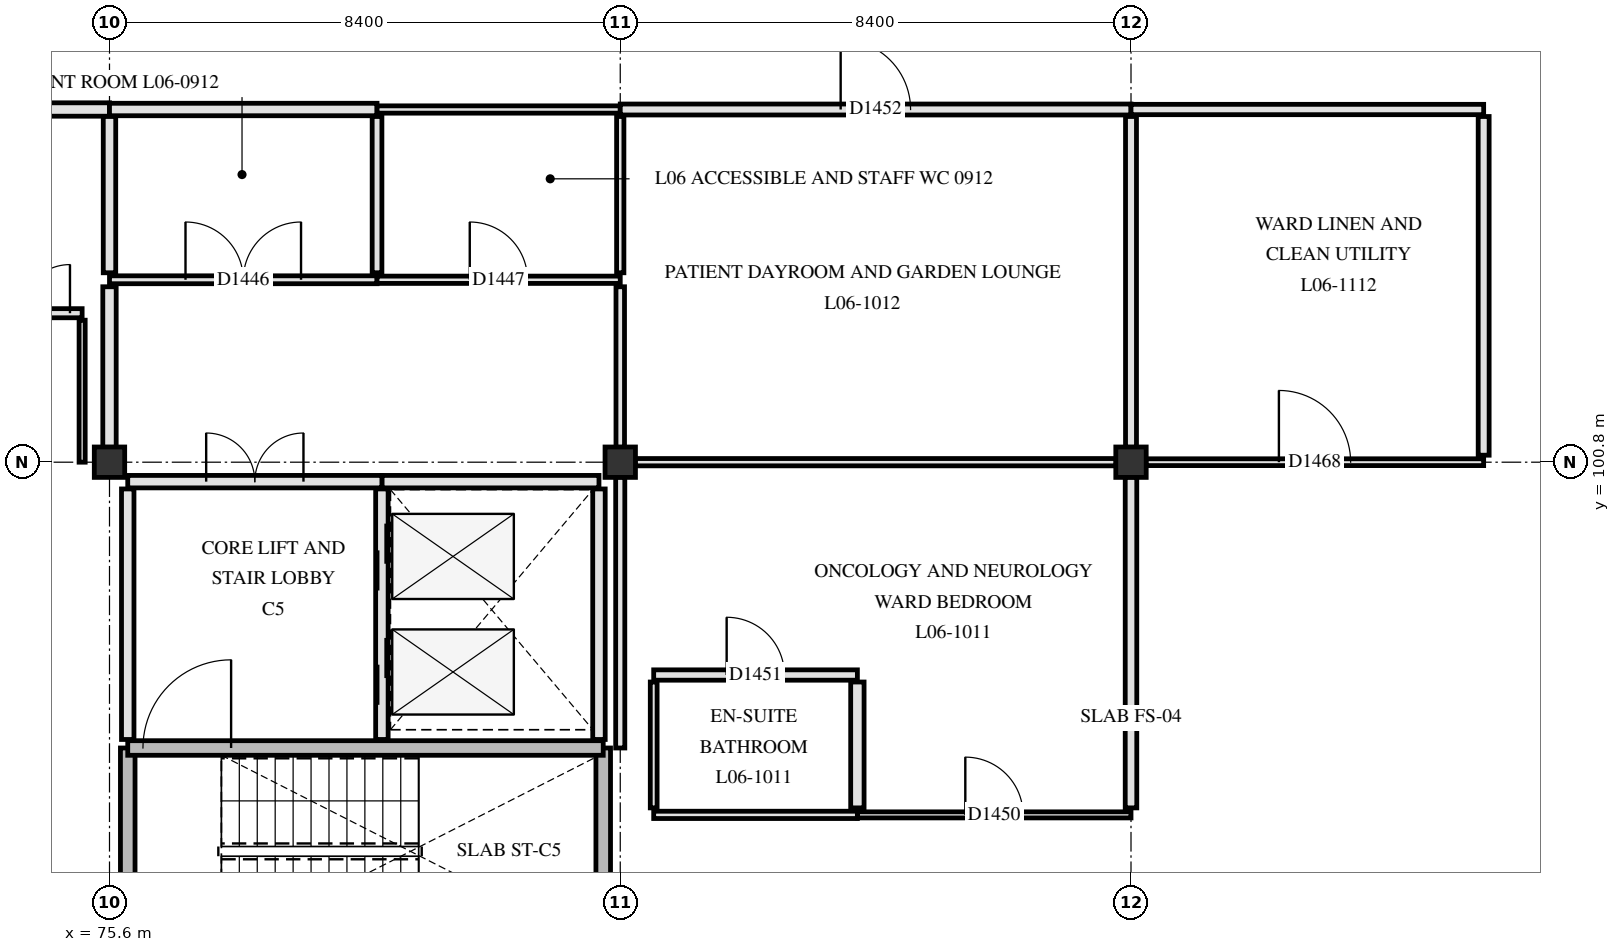
"""IFC4 building model, lengths in metres.
Left out: names, types, materials, properties, quantities, classifications, styles, units other than length and angle.
Written with IfcOpenShell. Run it as: python <this file> out.ifc"""

import sys

from ifc_helpers import new_model, si_unit, direction, frame, frame_2d, origin, origin_2d, place, context, subcontext, project, spatial, rectangle, extrude, element, fill, save


model = new_model("IFC4")
c1 = context("Model", 3, precision=1e-05, world=origin(), true_north=direction((0.0, 1.0)))
c2 = subcontext(c1, "Body", "Model", "MODEL_VIEW")
j1 = project(units=[si_unit("LENGTHUNIT", "METRE"), si_unit("PLANEANGLEUNIT", "RADIAN")], contexts=[c1])
p1 = place(None, origin())
s1 = spatial("IfcSite", under=j1, at=p1, CompositionType="ELEMENT")
p2 = place(p1, origin())
s2 = spatial("IfcBuilding", under=s1, at=p2, CompositionType="ELEMENT")
p3 = place(p2, frame((0.0, 0.0, 26.4)))
s3 = spatial("IfcBuildingStorey", under=s2, at=p3, CompositionType="ELEMENT", Elevation=26.4)
for number, where, z_axis, x_axis in (
    (1, (75.6, 100.8, 0.0), (0.0, 0.0, 1.0), (1.0, 0.0, 0.0)),
    (2, (84.0, 100.8, 0.0), (0.0, 0.0, 1.0), (1.0, 0.0, 0.0)),
    (3, (92.4, 100.8, 0.0), (0.0, 0.0, 1.0), (1.0, 0.0, 0.0)),
):
    element("IfcColumn", number, at=place(p3, frame(where, z_axis=z_axis, x_axis=x_axis)), inside=s3, PredefinedType="COLUMN", context=c2, shape_type="SweptSolid", body=[
        extrude(rectangle(XDim=0.5, YDim=0.5, at=origin_2d()), origin(), (0.0, 0.0, 1.0), 3.9),
    ])
for number, where, z_axis, x_axis in (
    (4, (75.9, 92.78, 0.0), (0.0, 0.0, 1.0), (0.0, 1.0, 0.0)),
    (5, (83.72, 92.78, 0.0), (0.0, 0.0, 1.0), (0.0, 1.0, 0.0)),
):
    element("IfcWall", number, at=place(p3, frame(where, z_axis=z_axis, x_axis=x_axis)), inside=s3, PredefinedType="SHEAR", context=c2, shape_type="SweptSolid", body=[
        extrude(rectangle(XDim=3.32, YDim=0.24, at=frame_2d((1.66, 0.0))), origin(), (0.0, 0.0, 1.0), 3.62),
    ])
p4 = place(p3, frame((75.9, 96.1, 0.0), z_axis=(0.0, 0.0, 1.0), x_axis=(1.0, 0.0, 0.0)))
e6 = element("IfcWall", 6, at=p4, inside=s3, PredefinedType="SHEAR", context=c2, shape_type="SweptSolid", body=[
    extrude(rectangle(XDim=7.82, YDim=0.24, at=frame_2d((3.91, 0.0))), origin(), (0.0, 0.0, 1.0), 3.62),
])
p5 = place(p4, frame((0.25, 0.0, 0.0)))
e7 = element("IfcOpeningElement", 7, at=p5, cuts=e6, PredefinedType="OPENING", context=c2, shape_type="SweptSolid", body=[
    extrude(rectangle(XDim=1.45, YDim=2.2, at=frame_2d((0.725, 1.1))), frame((0.0, 0.13, 0.0), z_axis=(0.0, -1.0, 0.0), x_axis=(1.0, 0.0, 0.0)), (0.0, 0.0, 1.0), 0.26),
])
p6 = place(p3, frame((80.08, 96.24, 0.0), z_axis=(0.0, 0.0, 1.0), x_axis=(0.0, 1.0, 0.0)))
e8 = element("IfcWall", 8, at=p6, inside=s3, PredefinedType="PARTITIONING", context=c2, shape_type="SweptSolid", body=[
    extrude(rectangle(XDim=4.12, YDim=0.205, at=frame_2d((2.06, 0.0))), origin(), (0.0, 0.0, 1.0), 3.61),
])
p7 = place(p6, frame((0.57, 0.0, 0.0)))
e9 = element("IfcOpeningElement", 9, at=p7, cuts=e8, PredefinedType="OPENING", context=c2, shape_type="SweptSolid", body=[
    extrude(rectangle(XDim=1.1, YDim=2.15, at=frame_2d((0.55, 1.075))), frame((0.0, 0.113, 0.0), z_axis=(0.0, -1.0, 0.0), x_axis=(1.0, 0.0, 0.0)), (0.0, 0.0, 1.0), 0.225),
])
p8 = place(p6, frame((2.45, 0.0, 0.0)))
e10 = element("IfcOpeningElement", 10, at=p8, cuts=e8, PredefinedType="OPENING", context=c2, shape_type="SweptSolid", body=[
    extrude(rectangle(XDim=1.1, YDim=2.15, at=frame_2d((0.55, 1.075))), frame((0.0, 0.113, 0.0), z_axis=(0.0, -1.0, 0.0), x_axis=(1.0, 0.0, 0.0)), (0.0, 0.0, 1.0), 0.225),
])
p9 = place(p3, frame((83.65, 96.24, 0.0), z_axis=(0.0, 0.0, 1.0), x_axis=(0.0, 1.0, 0.0)))
e11 = element("IfcWall", 11, at=p9, inside=s3, PredefinedType="PARTITIONING", context=c2, shape_type="SweptSolid", body=[
    extrude(rectangle(XDim=4.12, YDim=0.205, at=frame_2d((2.06, 0.0))), origin(), (0.0, 0.0, 1.0), 3.61),
])
p10 = place(p3, frame((80.08, 100.48, 0.0), z_axis=(0.0, 0.0, 1.0), x_axis=(1.0, 0.0, 0.0)))
e12 = element("IfcWall", 12, at=p10, inside=s3, PredefinedType="PARTITIONING", context=c2, shape_type="SweptSolid", body=[
    extrude(rectangle(XDim=3.57, YDim=0.205, at=frame_2d((1.785, 0.0))), origin(), (0.0, 0.0, 1.0), 3.61),
])
p11 = place(p3, frame((75.9, 96.24, 0.0), z_axis=(0.0, 0.0, 1.0), x_axis=(0.0, 1.0, 0.0)))
e13 = element("IfcWall", 13, at=p11, inside=s3, PredefinedType="PARTITIONING", context=c2, shape_type="SweptSolid", body=[
    extrude(rectangle(XDim=4.12, YDim=0.205, at=frame_2d((2.06, 0.0))), origin(), (0.0, 0.0, 1.0), 3.61),
])
p12 = place(p3, frame((75.9, 100.48, 0.0), z_axis=(0.0, 0.0, 1.0), x_axis=(1.0, 0.0, 0.0)))
e14 = element("IfcWall", 14, at=p12, inside=s3, PredefinedType="PARTITIONING", context=c2, shape_type="SweptSolid", body=[
    extrude(rectangle(XDim=4.18, YDim=0.205, at=frame_2d((2.09, 0.0))), origin(), (0.0, 0.0, 1.0), 3.61),
])
p13 = place(p12, frame((1.29, 0.0, 0.0)))
e15 = element("IfcOpeningElement", 15, at=p13, cuts=e14, PredefinedType="OPENING", context=c2, shape_type="SweptSolid", body=[
    extrude(rectangle(XDim=1.6, YDim=2.25, at=frame_2d((0.8, 1.125))), frame((0.0, 0.113, 0.0), z_axis=(0.0, -1.0, 0.0), x_axis=(1.0, 0.0, 0.0)), (0.0, 0.0, 1.0), 0.225),
])
p14 = place(p3, frame((84.55, 95.0, 0.0), z_axis=(0.0, 0.0, 1.0), x_axis=(1.0, 0.0, 0.0)))
e16 = element("IfcWall", 16, at=p14, inside=s3, PredefinedType="PARTITIONING", context=c2, shape_type="SweptSolid", body=[
    extrude(rectangle(XDim=3.35, YDim=0.12, at=frame_2d((1.675, 0.0))), origin(), (0.0, 0.0, 1.0), 3.61),
])
p15 = place(p3, frame((87.9, 95.0, 0.0), z_axis=(0.0, 0.0, 1.0), x_axis=(1.0, 0.0, 0.0)))
e17 = element("IfcWall", 17, at=p15, inside=s3, PredefinedType="PARTITIONING", context=c2, shape_type="SweptSolid", body=[
    extrude(rectangle(XDim=4.5, YDim=0.1, at=frame_2d((2.25, 0.0))), origin(), (0.0, 0.0, 1.0), 3.21),
])
p16 = place(p15, frame((1.775, 0.0, 0.0)))
e18 = element("IfcOpeningElement", 18, at=p16, cuts=e17, PredefinedType="OPENING", context=c2, shape_type="SweptSolid", body=[
    extrude(rectangle(XDim=0.95, YDim=2.1, at=frame_2d((0.475, 1.05))), frame((0.0, 0.06, 0.0), z_axis=(0.0, -1.0, 0.0), x_axis=(1.0, 0.0, 0.0)), (0.0, 0.0, 1.0), 0.12),
])
p17 = place(p3, frame((84.55, 97.3, 0.0), z_axis=(0.0, 0.0, 1.0), x_axis=(1.0, 0.0, 0.0)))
e19 = element("IfcWall", 19, at=p17, inside=s3, PredefinedType="PARTITIONING", context=c2, shape_type="SweptSolid", body=[
    extrude(rectangle(XDim=3.35, YDim=0.17, at=frame_2d((1.675, 0.0))), origin(), (0.0, 0.0, 1.0), 3.61),
])
p18 = place(p17, frame((1.2, 0.0, 0.0)))
e20 = element("IfcOpeningElement", 20, at=p18, cuts=e19, PredefinedType="OPENING", context=c2, shape_type="SweptSolid", body=[
    extrude(rectangle(XDim=0.95, YDim=2.1, at=frame_2d((0.475, 1.05))), frame((0.0, 0.095, 0.0), z_axis=(0.0, -1.0, 0.0), x_axis=(1.0, 0.0, 0.0)), (0.0, 0.0, 1.0), 0.19),
])
p19 = place(p3, frame((84.245, 100.8, 0.0), z_axis=(0.0, 0.0, 1.0), x_axis=(1.0, 0.0, 0.0)))
e21 = element("IfcWall", 21, at=p19, inside=s3, PredefinedType="PARTITIONING", context=c2, shape_type="SweptSolid", body=[
    extrude(rectangle(XDim=7.91, YDim=0.12, at=frame_2d((3.955, 0.0))), origin(), (0.0, 0.0, 1.0), 3.21),
])
p20 = place(p3, frame((92.645, 100.8, 0.0), z_axis=(0.0, 0.0, 1.0), x_axis=(1.0, 0.0, 0.0)))
e22 = element("IfcWall", 22, at=p20, inside=s3, PredefinedType="PARTITIONING", context=c2, shape_type="SweptSolid", body=[
    extrude(rectangle(XDim=5.555, YDim=0.112, at=frame_2d((2.777, 0.0))), origin(), (0.0, 0.0, 1.0), 3.21),
])
p21 = place(p20, frame((2.188, 0.0, 0.0)))
e23 = element("IfcOpeningElement", 23, at=p21, cuts=e22, PredefinedType="OPENING", context=c2, shape_type="SweptSolid", body=[
    extrude(rectangle(XDim=1.18, YDim=2.18, at=frame_2d((0.59, 1.09))), frame((0.0, 0.066, 0.0), z_axis=(0.0, -1.0, 0.0), x_axis=(1.0, 0.0, 0.0)), (0.0, 0.0, 1.0), 0.132),
])
p22 = place(p3, frame((73.15, 103.25, 0.0), z_axis=(0.0, 0.0, 1.0), x_axis=(1.0, 0.0, 0.0)))
e24 = element("IfcWall", 24, at=p22, inside=s3, PredefinedType="PARTITIONING", context=c2, shape_type="SweptSolid", body=[
    extrude(rectangle(XDim=2.0, YDim=0.15, at=frame_2d((1.0, 0.0))), origin(), (0.0, 0.0, 1.0), 3.61),
])
p23 = place(p22, frame((0.2, 0.0, 0.0)))
e25 = element("IfcOpeningElement", 25, at=p23, cuts=e24, PredefinedType="OPENING", context=c2, shape_type="SweptSolid", body=[
    extrude(rectangle(XDim=1.6, YDim=2.25, at=frame_2d((0.8, 1.125))), frame((0.0, 0.085, 0.0), z_axis=(0.0, -1.0, 0.0), x_axis=(1.0, 0.0, 0.0)), (0.0, 0.0, 1.0), 0.17),
])
p24 = place(p3, frame((75.6, 103.8, 0.0), z_axis=(0.0, 0.0, 1.0), x_axis=(1.0, 0.0, 0.0)))
e26 = element("IfcWall", 26, at=p24, inside=s3, PredefinedType="PARTITIONING", context=c2, shape_type="SweptSolid", body=[
    extrude(rectangle(XDim=4.4, YDim=0.13, at=frame_2d((2.2, 0.0))), origin(), (0.0, 0.0, 1.0), 3.21),
])
p25 = place(p24, frame((1.25, 0.0, 0.0)))
e27 = element("IfcOpeningElement", 27, at=p25, cuts=e26, PredefinedType="OPENING", context=c2, shape_type="SweptSolid", body=[
    extrude(rectangle(XDim=1.9, YDim=2.3, at=frame_2d((0.95, 1.15))), frame((0.0, 0.075, 0.0), z_axis=(0.0, -1.0, 0.0), x_axis=(1.0, 0.0, 0.0)), (0.0, 0.0, 1.0), 0.15),
])
p26 = place(p3, frame((80.0, 103.8, 0.0), z_axis=(0.0, 0.0, 1.0), x_axis=(1.0, 0.0, 0.0)))
e28 = element("IfcWall", 28, at=p26, inside=s3, PredefinedType="PARTITIONING", context=c2, shape_type="SweptSolid", body=[
    extrude(rectangle(XDim=4.0, YDim=0.12, at=frame_2d((2.0, 0.0))), origin(), (0.0, 0.0, 1.0), 3.21),
])
p27 = place(p26, frame((1.525, 0.0, 0.0)))
e29 = element("IfcOpeningElement", 29, at=p27, cuts=e28, PredefinedType="OPENING", context=c2, shape_type="SweptSolid", body=[
    extrude(rectangle(XDim=0.95, YDim=2.1, at=frame_2d((0.475, 1.05))), frame((0.0, 0.07, 0.0), z_axis=(0.0, -1.0, 0.0), x_axis=(1.0, 0.0, 0.0)), (0.0, 0.0, 1.0), 0.14),
])
p28 = place(p3, frame((69.8, 106.6, 0.0), z_axis=(0.0, 0.0, 1.0), x_axis=(1.0, 0.0, 0.0)))
e30 = element("IfcWall", 30, at=p28, inside=s3, PredefinedType="PARTITIONING", context=c2, shape_type="SweptSolid", body=[
    extrude(rectangle(XDim=5.8, YDim=0.22, at=frame_2d((2.9, 0.0))), origin(), (0.0, 0.0, 1.0), 3.21),
])
p29 = place(p3, frame((75.6, 106.6, 0.0), z_axis=(0.0, 0.0, 1.0), x_axis=(1.0, 0.0, 0.0)))
e31 = element("IfcWall", 31, at=p29, inside=s3, PredefinedType="PARTITIONING", context=c2, shape_type="SweptSolid", body=[
    extrude(rectangle(XDim=4.4, YDim=0.205, at=frame_2d((2.2, 0.0))), origin(), (0.0, 0.0, 1.0), 3.21),
])
p30 = place(p3, frame((80.0, 106.6, 0.0), z_axis=(0.0, 0.0, 1.0), x_axis=(1.0, 0.0, 0.0)))
e32 = element("IfcWall", 32, at=p30, inside=s3, PredefinedType="PARTITIONING", context=c2, shape_type="SweptSolid", body=[
    extrude(rectangle(XDim=4.0, YDim=0.12, at=frame_2d((2.0, 0.0))), origin(), (0.0, 0.0, 1.0), 3.21),
])
p31 = place(p3, frame((84.0, 106.6, 0.0), z_axis=(0.0, 0.0, 1.0), x_axis=(1.0, 0.0, 0.0)))
e33 = element("IfcWall", 33, at=p31, inside=s3, PredefinedType="PARTITIONING", context=c2, shape_type="SweptSolid", body=[
    extrude(rectangle(XDim=8.4, YDim=0.18, at=frame_2d((4.2, 0.0))), origin(), (0.0, 0.0, 1.0), 3.21),
])
p32 = place(p31, frame((3.625, 0.0, 0.0)))
e34 = element("IfcOpeningElement", 34, at=p32, cuts=e33, PredefinedType="OPENING", context=c2, shape_type="SweptSolid", body=[
    extrude(rectangle(XDim=1.15, YDim=2.15, at=frame_2d((0.575, 1.075))), frame((0.0, 0.1, 0.0), z_axis=(0.0, -1.0, 0.0), x_axis=(1.0, 0.0, 0.0)), (0.0, 0.0, 1.0), 0.2),
])
p33 = place(p3, frame((92.4, 106.6, 0.0), z_axis=(0.0, 0.0, 1.0), x_axis=(1.0, 0.0, 0.0)))
e35 = element("IfcWall", 35, at=p33, inside=s3, PredefinedType="PARTITIONING", context=c2, shape_type="SweptSolid", body=[
    extrude(rectangle(XDim=5.8, YDim=0.17, at=frame_2d((2.9, 0.0))), origin(), (0.0, 0.0, 1.0), 3.21),
])
p34 = place(p3, frame((75.15, 100.8, 0.0), z_axis=(0.0, 0.0, 1.0), x_axis=(0.0, 1.0, 0.0)))
e36 = element("IfcWall", 36, at=p34, inside=s3, PredefinedType="PARTITIONING", context=c2, shape_type="SweptSolid", body=[
    extrude(rectangle(XDim=2.335, YDim=0.1, at=frame_2d((1.167, 0.0))), origin(), (0.0, 0.0, 1.0), 3.21),
])
p35 = place(p3, frame((75.6, 101.045, 0.0), z_axis=(0.0, 0.0, 1.0), x_axis=(0.0, 1.0, 0.0)))
e37 = element("IfcWall", 37, at=p35, inside=s3, PredefinedType="PARTITIONING", context=c2, shape_type="SweptSolid", body=[
    extrude(rectangle(XDim=2.64, YDim=0.22, at=frame_2d((1.32, 0.0))), origin(), (0.0, 0.0, 1.0), 3.21),
])
p36 = place(p3, frame((75.6, 103.915, 0.0), z_axis=(0.0, 0.0, 1.0), x_axis=(0.0, 1.0, 0.0)))
e38 = element("IfcWall", 38, at=p36, inside=s3, PredefinedType="PARTITIONING", context=c2, shape_type="SweptSolid", body=[
    extrude(rectangle(XDim=2.57, YDim=0.205, at=frame_2d((1.285, 0.0))), origin(), (0.0, 0.0, 1.0), 3.21),
])
p37 = place(p3, frame((80.0, 103.915, 0.0), z_axis=(0.0, 0.0, 1.0), x_axis=(0.0, 1.0, 0.0)))
e39 = element("IfcWall", 39, at=p37, inside=s3, PredefinedType="PARTITIONING", context=c2, shape_type="SweptSolid", body=[
    extrude(rectangle(XDim=2.57, YDim=0.16, at=frame_2d((1.285, 0.0))), origin(), (0.0, 0.0, 1.0), 3.34),
])
p38 = place(p3, frame((84.0, 96.1, 0.0), z_axis=(0.0, 0.0, 1.0), x_axis=(0.0, 1.0, 0.0)))
e40 = element("IfcWall", 40, at=p38, inside=s3, PredefinedType="PARTITIONING", context=c2, shape_type="SweptSolid", body=[
    extrude(rectangle(XDim=4.455, YDim=0.15, at=frame_2d((2.228, 0.0))), origin(), (0.0, 0.0, 1.0), 3.21),
])
p39 = place(p3, frame((84.0, 101.045, 0.0), z_axis=(0.0, 0.0, 1.0), x_axis=(0.0, 1.0, 0.0)))
e41 = element("IfcWall", 41, at=p39, inside=s3, PredefinedType="PARTITIONING", context=c2, shape_type="SweptSolid", body=[
    extrude(rectangle(XDim=2.64, YDim=0.14, at=frame_2d((1.32, 0.0))), origin(), (0.0, 0.0, 1.0), 3.21),
])
p40 = place(p3, frame((84.0, 103.915, 0.0), z_axis=(0.0, 0.0, 1.0), x_axis=(0.0, 1.0, 0.0)))
e42 = element("IfcWall", 42, at=p40, inside=s3, PredefinedType="PARTITIONING", context=c2, shape_type="SweptSolid", body=[
    extrude(rectangle(XDim=2.57, YDim=0.12, at=frame_2d((1.285, 0.0))), origin(), (0.0, 0.0, 1.0), 3.21),
])
p41 = place(p3, frame((84.55, 95.115, 0.0), z_axis=(0.0, 0.0, 1.0), x_axis=(0.0, 1.0, 0.0)))
e43 = element("IfcWall", 43, at=p41, inside=s3, PredefinedType="PARTITIONING", context=c2, shape_type="SweptSolid", body=[
    extrude(rectangle(XDim=2.07, YDim=0.112, at=frame_2d((1.035, 0.0))), origin(), (0.0, 0.0, 1.0), 3.34),
])
p42 = place(p3, frame((87.9, 95.115, 0.0), z_axis=(0.0, 0.0, 1.0), x_axis=(0.0, 1.0, 0.0)))
e44 = element("IfcWall", 44, at=p42, inside=s3, PredefinedType="PARTITIONING", context=c2, shape_type="SweptSolid", body=[
    extrude(rectangle(XDim=2.07, YDim=0.22, at=frame_2d((1.035, 0.0))), origin(), (0.0, 0.0, 1.0), 3.34),
])
p43 = place(p3, frame((92.4, 95.115, 0.0), z_axis=(0.0, 0.0, 1.0), x_axis=(0.0, 1.0, 0.0)))
e45 = element("IfcWall", 45, at=p43, inside=s3, PredefinedType="PARTITIONING", context=c2, shape_type="SweptSolid", body=[
    extrude(rectangle(XDim=5.44, YDim=0.19, at=frame_2d((2.72, 0.0))), origin(), (0.0, 0.0, 1.0), 3.21),
])
p44 = place(p3, frame((92.4, 101.045, 0.0), z_axis=(0.0, 0.0, 1.0), x_axis=(0.0, 1.0, 0.0)))
e46 = element("IfcWall", 46, at=p44, inside=s3, PredefinedType="PARTITIONING", context=c2, shape_type="SweptSolid", body=[
    extrude(rectangle(XDim=5.44, YDim=0.18, at=frame_2d((2.72, 0.0))), origin(), (0.0, 0.0, 1.0), 3.21),
])
p45 = place(p3, frame((98.2, 100.915, 0.0), z_axis=(0.0, 0.0, 1.0), x_axis=(0.0, 1.0, 0.0)))
e47 = element("IfcWall", 47, at=p45, inside=s3, PredefinedType="PARTITIONING", context=c2, shape_type="SweptSolid", body=[
    extrude(rectangle(XDim=5.57, YDim=0.18, at=frame_2d((2.785, 0.0))), origin(), (0.0, 0.0, 1.0), 3.34),
])
p46 = place(p5, origin())
e48 = element("IfcDoor", 48, at=p46, inside=s3, OperationType="SINGLE_SWING_RIGHT", PredefinedType="DOOR", context=c2, shape_type="SweptSolid", body=[
    extrude(rectangle(XDim=1.45, YDim=2.2, at=frame_2d((0.725, 1.1))), frame((0.0, 0.025, 0.0), z_axis=(0.0, -1.0, 0.0), x_axis=(1.0, 0.0, 0.0)), (0.0, 0.0, 1.0), 0.05),
])
fill(e7, e48)
p47 = place(p7, origin())
e49 = element("IfcDoor", 49, at=p47, inside=s3, OperationType="SLIDING_TO_LEFT", PredefinedType="DOOR", context=c2, shape_type="SweptSolid", body=[
    extrude(rectangle(XDim=1.1, YDim=2.15, at=frame_2d((0.55, 1.075))), frame((0.0, 0.025, 0.0), z_axis=(0.0, -1.0, 0.0), x_axis=(1.0, 0.0, 0.0)), (0.0, 0.0, 1.0), 0.05),
])
fill(e9, e49)
p48 = place(p8, origin())
e50 = element("IfcDoor", 50, at=p48, inside=s3, OperationType="SLIDING_TO_LEFT", PredefinedType="DOOR", context=c2, shape_type="SweptSolid", body=[
    extrude(rectangle(XDim=1.1, YDim=2.15, at=frame_2d((0.55, 1.075))), frame((0.0, 0.025, 0.0), z_axis=(0.0, -1.0, 0.0), x_axis=(1.0, 0.0, 0.0)), (0.0, 0.0, 1.0), 0.05),
])
fill(e10, e50)
p49 = place(p13, origin())
e51 = element("IfcDoor", 51, at=p49, inside=s3, OperationType="DOUBLE_SWING_LEFT", PredefinedType="DOOR", context=c2, shape_type="SweptSolid", body=[
    extrude(rectangle(XDim=1.6, YDim=2.25, at=frame_2d((0.8, 1.125))), frame((0.0, 0.025, 0.0), z_axis=(0.0, -1.0, 0.0), x_axis=(1.0, 0.0, 0.0)), (0.0, 0.0, 1.0), 0.05),
])
fill(e15, e51)
p50 = place(p23, origin())
e52 = element("IfcDoor", 52, at=p50, inside=s3, OperationType="DOUBLE_SWING_LEFT", PredefinedType="DOOR", context=c2, shape_type="SweptSolid", body=[
    extrude(rectangle(XDim=1.6, YDim=2.25, at=frame_2d((0.8, 1.125))), frame((0.0, 0.025, 0.0), z_axis=(0.0, -1.0, 0.0), x_axis=(1.0, 0.0, 0.0)), (0.0, 0.0, 1.0), 0.05),
])
fill(e25, e52)
p51 = place(p25, origin())
e53 = element("IfcDoor", 53, at=p51, inside=s3, OperationType="DOUBLE_SWING_LEFT", PredefinedType="DOOR", context=c2, shape_type="SweptSolid", body=[
    extrude(rectangle(XDim=1.9, YDim=2.3, at=frame_2d((0.95, 1.15))), frame((0.0, 0.025, 0.0), z_axis=(0.0, -1.0, 0.0), x_axis=(1.0, 0.0, 0.0)), (0.0, 0.0, 1.0), 0.05),
])
fill(e27, e53)
p52 = place(p27, origin())
e54 = element("IfcDoor", 54, at=p52, inside=s3, OperationType="SINGLE_SWING_LEFT", PredefinedType="DOOR", context=c2, shape_type="SweptSolid", body=[
    extrude(rectangle(XDim=0.95, YDim=2.1, at=frame_2d((0.475, 1.05))), frame((0.0, 0.025, 0.0), z_axis=(0.0, -1.0, 0.0), x_axis=(1.0, 0.0, 0.0)), (0.0, 0.0, 1.0), 0.05),
])
fill(e29, e54)
p53 = place(p16, origin())
e55 = element("IfcDoor", 55, at=p53, inside=s3, OperationType="SINGLE_SWING_LEFT", PredefinedType="DOOR", context=c2, shape_type="SweptSolid", body=[
    extrude(rectangle(XDim=0.95, YDim=2.1, at=frame_2d((0.475, 1.05))), frame((0.0, 0.025, 0.0), z_axis=(0.0, -1.0, 0.0), x_axis=(1.0, 0.0, 0.0)), (0.0, 0.0, 1.0), 0.05),
])
fill(e18, e55)
p54 = place(p18, origin())
e56 = element("IfcDoor", 56, at=p54, inside=s3, OperationType="SINGLE_SWING_LEFT", PredefinedType="DOOR", context=c2, shape_type="SweptSolid", body=[
    extrude(rectangle(XDim=0.95, YDim=2.1, at=frame_2d((0.475, 1.05))), frame((0.0, 0.025, 0.0), z_axis=(0.0, -1.0, 0.0), x_axis=(1.0, 0.0, 0.0)), (0.0, 0.0, 1.0), 0.05),
])
fill(e20, e56)
p55 = place(p32, origin())
e57 = element("IfcDoor", 57, at=p55, inside=s3, OperationType="SINGLE_SWING_LEFT", PredefinedType="DOOR", context=c2, shape_type="SweptSolid", body=[
    extrude(rectangle(XDim=1.15, YDim=2.15, at=frame_2d((0.575, 1.075))), frame((0.0, 0.025, 0.0), z_axis=(0.0, -1.0, 0.0), x_axis=(1.0, 0.0, 0.0)), (0.0, 0.0, 1.0), 0.05),
])
fill(e34, e57)
p56 = place(p21, origin())
e58 = element("IfcDoor", 58, at=p56, inside=s3, OperationType="SINGLE_SWING_LEFT", PredefinedType="DOOR", context=c2, shape_type="SweptSolid", body=[
    extrude(rectangle(XDim=1.18, YDim=2.18, at=frame_2d((0.59, 1.09))), frame((0.0, 0.025, 0.0), z_axis=(0.0, -1.0, 0.0), x_axis=(1.0, 0.0, 0.0)), (0.0, 0.0, 1.0), 0.05),
])
fill(e23, e58)
save(model, sys.argv[1])
